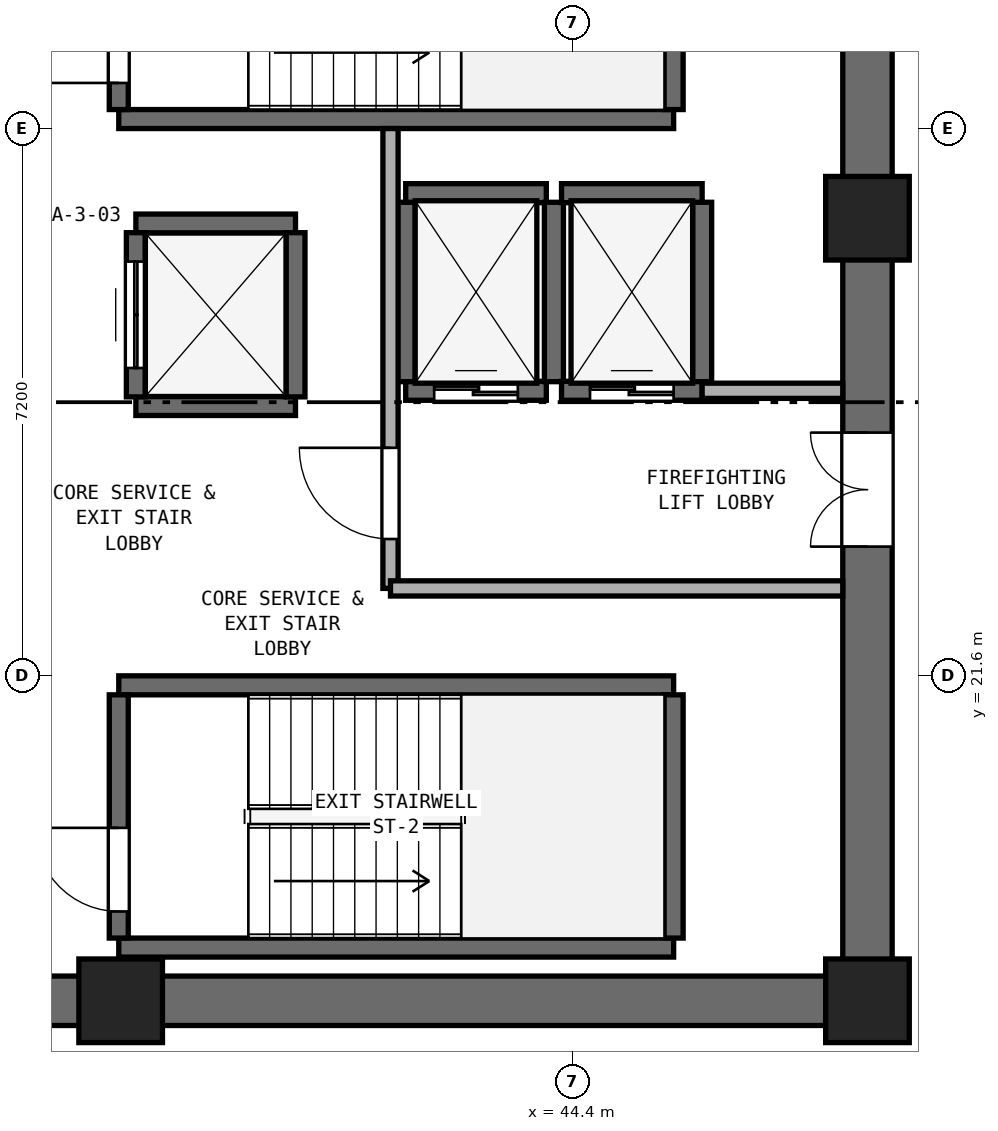
"""IFC4 building model, lengths in metres.
Left out: names, types, materials, properties, quantities, classifications, styles, units other than length and angle.
Written with IfcOpenShell. Run it as: python <this file> out.ifc"""

import sys

from ifc_helpers import new_model, si_unit, direction, frame, frame_2d, origin, origin_2d, place, context, subcontext, project, spatial, rectangle, extrude, element, fill, save


model = new_model("IFC4")
c1 = context("Model", 3, precision=1e-05, world=origin(), true_north=direction((0.0, 1.0)))
c2 = subcontext(c1, "Body", "Model", "MODEL_VIEW")
j1 = project(units=[si_unit("LENGTHUNIT", "METRE"), si_unit("PLANEANGLEUNIT", "RADIAN")], contexts=[c1])
p1 = place(None, origin())
s1 = spatial("IfcSite", under=j1, at=p1, CompositionType="ELEMENT")
p2 = place(p1, origin())
s2 = spatial("IfcBuilding", under=s1, at=p2, CompositionType="ELEMENT")
p3 = place(p2, frame((0.0, 0.0, 55.4)))
s3 = spatial("IfcBuildingStorey", under=s2, at=p3, CompositionType="ELEMENT", Elevation=55.4)
p4 = place(p3, frame((25.4, 17.325, 0.0), z_axis=(0.0, 0.0, 1.0), x_axis=(1.0, 0.0, 0.0)))
e1 = element("IfcWall", 1, at=p4, inside=s3, PredefinedType="SHEAR", context=c2, shape_type="SweptSolid", body=[
    extrude(rectangle(XDim=23.2, YDim=0.65, at=frame_2d((11.6, 0.0))), origin(), (0.0, 0.0, 1.0), 3.525),
])
p5 = place(p3, frame((48.275, 17.65, 0.0), z_axis=(0.0, 0.0, 1.0), x_axis=(0.0, 1.0, 0.0)))
e2 = element("IfcWall", 2, at=p5, inside=s3, PredefinedType="SHEAR", context=c2, shape_type="SweptSolid", body=[
    extrude(rectangle(XDim=15.1, YDim=0.65, at=frame_2d((7.55, 0.0))), origin(), (0.0, 0.0, 1.0), 3.525),
])
p6 = place(p5, frame((5.65, 0.0, 0.0)))
e3 = element("IfcOpeningElement", 3, at=p6, cuts=e2, PredefinedType="OPENING", context=c2, shape_type="SweptSolid", body=[
    extrude(rectangle(XDim=1.5, YDim=2.15, at=frame_2d((0.75, 1.075))), frame((0.0, 0.335, 0.0), z_axis=(0.0, -1.0, 0.0), x_axis=(1.0, 0.0, 0.0)), (0.0, 0.0, 1.0), 0.67),
])
for number, where, z_axis, x_axis in (
    (4, (38.45, 17.325, 0.0), (0.0, 0.0, 1.0), (1.0, 0.0, 0.0)),
    (5, (48.275, 17.325, 0.0), (0.0, 0.0, 1.0), (1.0, 0.0, 0.0)),
    (6, (48.275, 27.62, 0.0), (0.0, 0.0, 1.0), (1.0, 0.0, 0.0)),
):
    element("IfcColumn", number, at=place(p3, frame(where, z_axis=z_axis, x_axis=x_axis)), inside=s3, PredefinedType="PILASTER", context=c2, shape_type="SweptSolid", body=[
        extrude(rectangle(XDim=1.1, YDim=1.1, at=origin_2d()), origin(), (0.0, 0.0, 1.0), 3.8),
    ])
p7 = place(p3, frame((38.425, 28.925, 0.0), z_axis=(0.0, 0.0, 1.0), x_axis=(1.0, 0.0, 0.0)))
e7 = element("IfcWall", 7, at=p7, inside=s3, PredefinedType="SHEAR", context=c2, shape_type="SweptSolid", body=[
    extrude(rectangle(XDim=7.3, YDim=0.25, at=frame_2d((3.65, 0.0))), origin(), (0.0, 0.0, 1.0), 3.525),
])
p8 = place(p3, frame((38.425, 29.05, 0.0), z_axis=(0.0, 0.0, 1.0), x_axis=(0.0, 1.0, 0.0)))
e8 = element("IfcWall", 8, at=p8, inside=s3, PredefinedType="SHEAR", context=c2, shape_type="SweptSolid", body=[
    extrude(rectangle(XDim=3.2, YDim=0.25, at=frame_2d((1.6, 0.0))), origin(), (0.0, 0.0, 1.0), 3.525),
])
p9 = place(p8, frame((0.35, 0.0, 0.0)))
e9 = element("IfcOpeningElement", 9, at=p9, cuts=e8, PredefinedType="OPENING", context=c2, shape_type="SweptSolid", body=[
    extrude(rectangle(XDim=1.1, YDim=2.15, at=frame_2d((0.55, 1.075))), frame((0.0, 0.135, 0.0), z_axis=(0.0, -1.0, 0.0), x_axis=(1.0, 0.0, 0.0)), (0.0, 0.0, 1.0), 0.27),
])
p10 = place(p3, frame((45.725, 29.05, 0.0), z_axis=(0.0, 0.0, 1.0), x_axis=(0.0, 1.0, 0.0)))
e10 = element("IfcWall", 10, at=p10, inside=s3, PredefinedType="SHEAR", context=c2, shape_type="SweptSolid", body=[
    extrude(rectangle(XDim=3.2, YDim=0.25, at=frame_2d((1.6, 0.0))), origin(), (0.0, 0.0, 1.0), 3.525),
])
for number, where, z_axis, x_axis in (
    (11, (38.425, 18.025, 0.0), (0.0, 0.0, 1.0), (1.0, 0.0, 0.0)),
    (12, (38.425, 21.475, 0.0), (0.0, 0.0, 1.0), (1.0, 0.0, 0.0)),
):
    element("IfcWall", number, at=place(p3, frame(where, z_axis=z_axis, x_axis=x_axis)), inside=s3, PredefinedType="SHEAR", context=c2, shape_type="SweptSolid", body=[
        extrude(rectangle(XDim=7.3, YDim=0.25, at=frame_2d((3.65, 0.0))), origin(), (0.0, 0.0, 1.0), 3.525),
    ])
p11 = place(p3, frame((38.425, 18.15, 0.0), z_axis=(0.0, 0.0, 1.0), x_axis=(0.0, 1.0, 0.0)))
e13 = element("IfcWall", 13, at=p11, inside=s3, PredefinedType="SHEAR", context=c2, shape_type="SweptSolid", body=[
    extrude(rectangle(XDim=3.2, YDim=0.25, at=frame_2d((1.6, 0.0))), origin(), (0.0, 0.0, 1.0), 3.525),
])
p12 = place(p11, frame((0.35, 0.0, 0.0)))
e14 = element("IfcOpeningElement", 14, at=p12, cuts=e13, PredefinedType="OPENING", context=c2, shape_type="SweptSolid", body=[
    extrude(rectangle(XDim=1.1, YDim=2.15, at=frame_2d((0.55, 1.075))), frame((0.0, 0.135, 0.0), z_axis=(0.0, -1.0, 0.0), x_axis=(1.0, 0.0, 0.0)), (0.0, 0.0, 1.0), 0.27),
])
p13 = place(p3, frame((45.725, 18.15, 0.0), z_axis=(0.0, 0.0, 1.0), x_axis=(0.0, 1.0, 0.0)))
e15 = element("IfcWall", 15, at=p13, inside=s3, PredefinedType="SHEAR", context=c2, shape_type="SweptSolid", body=[
    extrude(rectangle(XDim=3.2, YDim=0.25, at=frame_2d((1.6, 0.0))), origin(), (0.0, 0.0, 1.0), 3.525),
])
p14 = place(p3, frame((42.2, 25.35, 0.0), z_axis=(0.0, 0.0, 1.0), x_axis=(1.0, 0.0, 0.0)))
e16 = element("IfcWall", 16, at=p14, inside=s3, PredefinedType="SHEAR", context=c2, shape_type="SweptSolid", body=[
    extrude(rectangle(XDim=1.85, YDim=0.25, at=frame_2d((0.925, 0.0))), origin(), (0.0, 0.0, 1.0), 3.525),
])
p15 = place(p14, frame((0.375, 0.0, 0.0)))
e17 = element("IfcOpeningElement", 17, at=p15, cuts=e16, PredefinedType="OPENING", context=c2, shape_type="SweptSolid", body=[
    extrude(rectangle(XDim=1.1, YDim=2.15, at=frame_2d((0.55, 1.075))), frame((0.0, 0.135, 0.0), z_axis=(0.0, -1.0, 0.0), x_axis=(1.0, 0.0, 0.0)), (0.0, 0.0, 1.0), 0.27),
])
p16 = place(p3, frame((42.2, 27.95, 0.0), z_axis=(0.0, 0.0, 1.0), x_axis=(1.0, 0.0, 0.0)))
e18 = element("IfcWall", 18, at=p16, inside=s3, PredefinedType="SHEAR", context=c2, shape_type="SweptSolid", body=[
    extrude(rectangle(XDim=1.85, YDim=0.25, at=frame_2d((0.925, 0.0))), origin(), (0.0, 0.0, 1.0), 3.525),
])
for number, where, z_axis, x_axis in (
    (19, (42.2, 25.47, 0.0), (0.0, 0.0, 1.0), (0.0, 1.0, 0.0)),
    (20, (44.15, 25.47, 0.0), (0.0, 0.0, 1.0), (0.0, 1.0, 0.0)),
):
    element("IfcWall", number, at=place(p3, frame(where, z_axis=z_axis, x_axis=x_axis)), inside=s3, PredefinedType="SHEAR", context=c2, shape_type="SweptSolid", body=[
        extrude(rectangle(XDim=2.36, YDim=0.25, at=frame_2d((1.18, 0.0))), origin(), (0.0, 0.0, 1.0), 3.525),
    ])
p17 = place(p3, frame((44.25, 25.35, 0.0), z_axis=(0.0, 0.0, 1.0), x_axis=(1.0, 0.0, 0.0)))
e21 = element("IfcWall", 21, at=p17, inside=s3, PredefinedType="SHEAR", context=c2, shape_type="SweptSolid", body=[
    extrude(rectangle(XDim=1.85, YDim=0.25, at=frame_2d((0.925, 0.0))), origin(), (0.0, 0.0, 1.0), 3.525),
])
p18 = place(p17, frame((0.375, 0.0, 0.0)))
e22 = element("IfcOpeningElement", 22, at=p18, cuts=e21, PredefinedType="OPENING", context=c2, shape_type="SweptSolid", body=[
    extrude(rectangle(XDim=1.1, YDim=2.15, at=frame_2d((0.55, 1.075))), frame((0.0, 0.135, 0.0), z_axis=(0.0, -1.0, 0.0), x_axis=(1.0, 0.0, 0.0)), (0.0, 0.0, 1.0), 0.27),
])
p19 = place(p3, frame((44.25, 27.95, 0.0), z_axis=(0.0, 0.0, 1.0), x_axis=(1.0, 0.0, 0.0)))
e23 = element("IfcWall", 23, at=p19, inside=s3, PredefinedType="SHEAR", context=c2, shape_type="SweptSolid", body=[
    extrude(rectangle(XDim=1.85, YDim=0.25, at=frame_2d((0.925, 0.0))), origin(), (0.0, 0.0, 1.0), 3.525),
])
p20 = place(p3, frame((46.1, 25.47, 0.0), z_axis=(0.0, 0.0, 1.0), x_axis=(0.0, 1.0, 0.0)))
e24 = element("IfcWall", 24, at=p20, inside=s3, PredefinedType="SHEAR", context=c2, shape_type="SweptSolid", body=[
    extrude(rectangle(XDim=2.36, YDim=0.25, at=frame_2d((1.18, 0.0))), origin(), (0.0, 0.0, 1.0), 3.525),
])
for number, where, z_axis, x_axis in (
    (25, (38.65, 25.15, 0.0), (0.0, 0.0, 1.0), (1.0, 0.0, 0.0)),
    (26, (38.65, 27.55, 0.0), (0.0, 0.0, 1.0), (1.0, 0.0, 0.0)),
):
    element("IfcWall", number, at=place(p3, frame(where, z_axis=z_axis, x_axis=x_axis)), inside=s3, PredefinedType="SHEAR", context=c2, shape_type="SweptSolid", body=[
        extrude(rectangle(XDim=2.1, YDim=0.25, at=frame_2d((1.05, 0.0))), origin(), (0.0, 0.0, 1.0), 3.525),
    ])
p21 = place(p3, frame((38.65, 25.27, 0.0), z_axis=(0.0, 0.0, 1.0), x_axis=(0.0, 1.0, 0.0)))
e27 = element("IfcWall", 27, at=p21, inside=s3, PredefinedType="SHEAR", context=c2, shape_type="SweptSolid", body=[
    extrude(rectangle(XDim=2.16, YDim=0.25, at=frame_2d((1.08, 0.0))), origin(), (0.0, 0.0, 1.0), 3.525),
])
p22 = place(p21, frame((0.38, 0.0, 0.0)))
e28 = element("IfcOpeningElement", 28, at=p22, cuts=e27, PredefinedType="OPENING", context=c2, shape_type="SweptSolid", body=[
    extrude(rectangle(XDim=1.4, YDim=2.2, at=frame_2d((0.7, 1.1))), frame((0.0, 0.135, 0.0), z_axis=(0.0, -1.0, 0.0), x_axis=(1.0, 0.0, 0.0)), (0.0, 0.0, 1.0), 0.27),
])
p23 = place(p3, frame((40.75, 25.27, 0.0), z_axis=(0.0, 0.0, 1.0), x_axis=(0.0, 1.0, 0.0)))
e29 = element("IfcWall", 29, at=p23, inside=s3, PredefinedType="SHEAR", context=c2, shape_type="SweptSolid", body=[
    extrude(rectangle(XDim=2.16, YDim=0.25, at=frame_2d((1.08, 0.0))), origin(), (0.0, 0.0, 1.0), 3.525),
])
p24 = place(p3, frame((42.0, 22.75, 0.0), z_axis=(0.0, 0.0, 1.0), x_axis=(0.0, 1.0, 0.0)))
e30 = element("IfcWall", 30, at=p24, inside=s3, PredefinedType="SOLIDWALL", context=c2, shape_type="SweptSolid", body=[
    extrude(rectangle(XDim=6.05, YDim=0.2, at=frame_2d((3.025, 0.0))), origin(), (0.0, 0.0, 1.0), 3.525),
])
p25 = place(p24, frame((0.65, 0.0, 0.0)))
e31 = element("IfcOpeningElement", 31, at=p25, cuts=e30, PredefinedType="OPENING", context=c2, shape_type="SweptSolid", body=[
    extrude(rectangle(XDim=1.2, YDim=2.15, at=frame_2d((0.6, 1.075))), frame((0.0, 0.11, 0.0), z_axis=(0.0, -1.0, 0.0), x_axis=(1.0, 0.0, 0.0)), (0.0, 0.0, 1.0), 0.22),
])
p26 = place(p3, frame((42.0, 22.75, 0.0), z_axis=(0.0, 0.0, 1.0), x_axis=(1.0, 0.0, 0.0)))
e32 = element("IfcWall", 32, at=p26, inside=s3, PredefinedType="SOLIDWALL", context=c2, shape_type="SweptSolid", body=[
    extrude(rectangle(XDim=5.95, YDim=0.2, at=frame_2d((2.975, 0.0))), origin(), (0.0, 0.0, 1.0), 3.525),
])
p27 = place(p3, frame((46.1, 25.35, 0.0), z_axis=(0.0, 0.0, 1.0), x_axis=(1.0, 0.0, 0.0)))
e33 = element("IfcWall", 33, at=p27, inside=s3, PredefinedType="SOLIDWALL", context=c2, shape_type="SweptSolid", body=[
    extrude(rectangle(XDim=1.85, YDim=0.2, at=frame_2d((0.925, 0.0))), origin(), (0.0, 0.0, 1.0), 3.525),
])
p28 = place(p9, origin())
e34 = element("IfcDoor", 34, at=p28, inside=s3, OperationType="SINGLE_SWING_LEFT", PredefinedType="DOOR", context=c2, shape_type="SweptSolid", body=[
    extrude(rectangle(XDim=1.1, YDim=2.15, at=frame_2d((0.55, 1.075))), frame((0.0, 0.025, 0.0), z_axis=(0.0, -1.0, 0.0), x_axis=(1.0, 0.0, 0.0)), (0.0, 0.0, 1.0), 0.05),
])
fill(e9, e34)
p29 = place(p12, origin())
e35 = element("IfcDoor", 35, at=p29, inside=s3, OperationType="SINGLE_SWING_RIGHT", PredefinedType="DOOR", context=c2, shape_type="SweptSolid", body=[
    extrude(rectangle(XDim=1.1, YDim=2.15, at=frame_2d((0.55, 1.075))), frame((0.0, 0.025, 0.0), z_axis=(0.0, -1.0, 0.0), x_axis=(1.0, 0.0, 0.0)), (0.0, 0.0, 1.0), 0.05),
])
fill(e14, e35)
p30 = place(p15, origin())
e36 = element("IfcDoor", 36, at=p30, inside=s3, OperationType="DOUBLE_DOOR_SLIDING", PredefinedType="DOOR", context=c2, shape_type="SweptSolid", body=[
    extrude(rectangle(XDim=1.1, YDim=2.15, at=frame_2d((0.55, 1.075))), frame((0.0, 0.025, 0.0), z_axis=(0.0, -1.0, 0.0), x_axis=(1.0, 0.0, 0.0)), (0.0, 0.0, 1.0), 0.05),
])
fill(e17, e36)
p31 = place(p18, origin())
e37 = element("IfcDoor", 37, at=p31, inside=s3, OperationType="DOUBLE_DOOR_SLIDING", PredefinedType="DOOR", context=c2, shape_type="SweptSolid", body=[
    extrude(rectangle(XDim=1.1, YDim=2.15, at=frame_2d((0.55, 1.075))), frame((0.0, 0.025, 0.0), z_axis=(0.0, -1.0, 0.0), x_axis=(1.0, 0.0, 0.0)), (0.0, 0.0, 1.0), 0.05),
])
fill(e22, e37)
p32 = place(p22, origin())
e38 = element("IfcDoor", 38, at=p32, inside=s3, OperationType="DOUBLE_DOOR_SLIDING", PredefinedType="DOOR", context=c2, shape_type="SweptSolid", body=[
    extrude(rectangle(XDim=1.4, YDim=2.2, at=frame_2d((0.7, 1.1))), frame((0.0, 0.025, 0.0), z_axis=(0.0, -1.0, 0.0), x_axis=(1.0, 0.0, 0.0)), (0.0, 0.0, 1.0), 0.05),
])
fill(e28, e38)
p33 = place(p25, origin())
e39 = element("IfcDoor", 39, at=p33, inside=s3, OperationType="SINGLE_SWING_RIGHT", PredefinedType="DOOR", context=c2, shape_type="SweptSolid", body=[
    extrude(rectangle(XDim=1.2, YDim=2.15, at=frame_2d((0.6, 1.075))), frame((0.0, 0.025, 0.0), z_axis=(0.0, -1.0, 0.0), x_axis=(1.0, 0.0, 0.0)), (0.0, 0.0, 1.0), 0.05),
])
fill(e31, e39)
p34 = place(p6, origin())
e40 = element("IfcDoor", 40, at=p34, inside=s3, OperationType="DOUBLE_DOOR_SINGLE_SWING", PredefinedType="DOOR", context=c2, shape_type="SweptSolid", body=[
    extrude(rectangle(XDim=1.5, YDim=2.15, at=frame_2d((0.75, 1.075))), frame((0.0, 0.025, 0.0), z_axis=(0.0, -1.0, 0.0), x_axis=(1.0, 0.0, 0.0)), (0.0, 0.0, 1.0), 0.05),
])
fill(e3, e40)
save(model, sys.argv[1])
